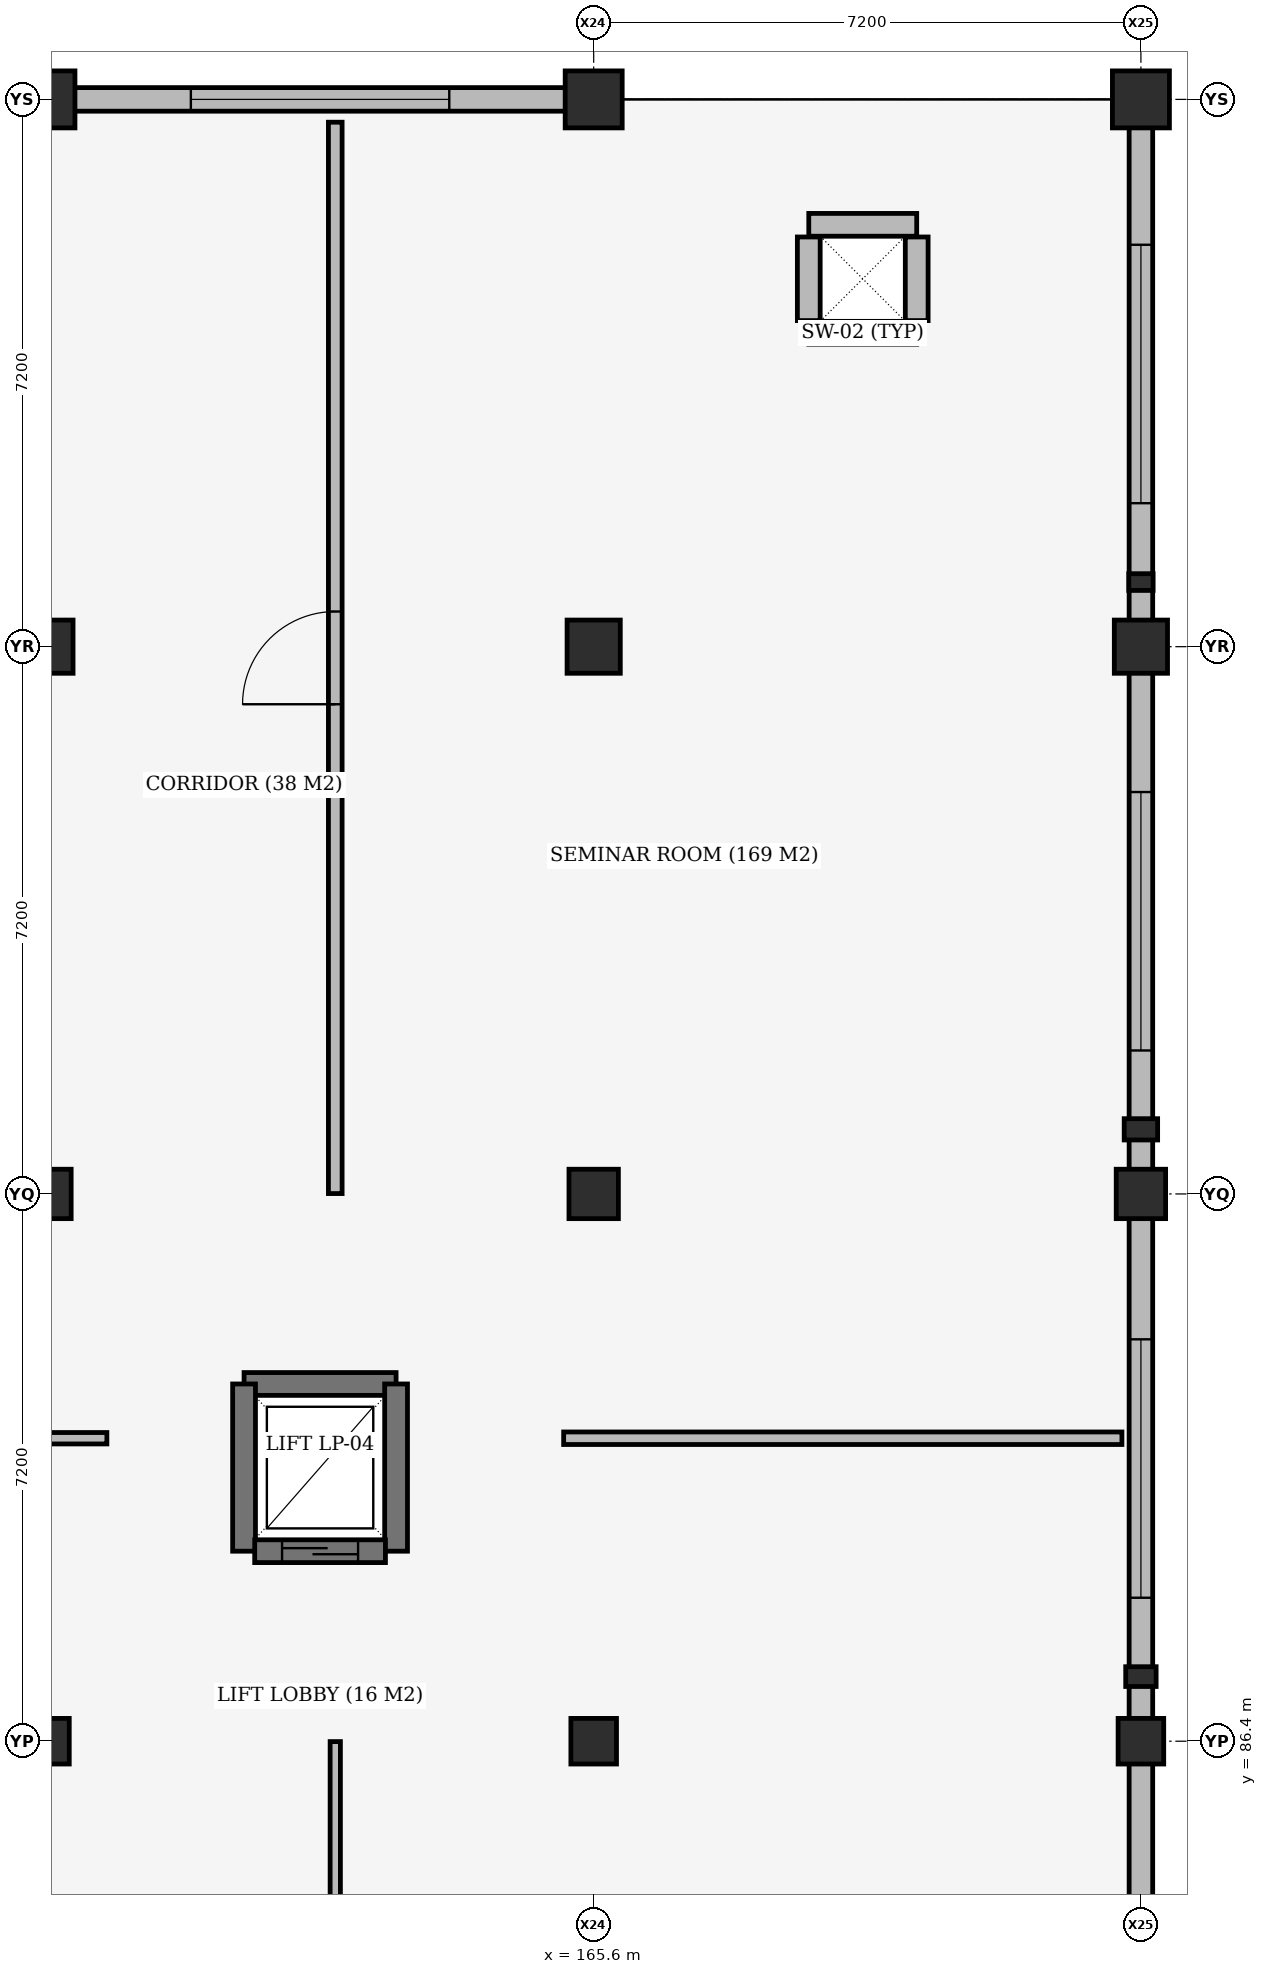
"""IFC4 building model, lengths in metres.
Left out: names, types, materials, properties, quantities, classifications, styles, units other than length and angle.
Written with IfcOpenShell. Run it as: python <this file> out.ifc"""

import sys

from ifc_helpers import new_model, si_unit, direction, frame, frame_2d, origin, origin_2d, place, context, subcontext, project, spatial, rectangle, extrude, element, fill, save


model = new_model("IFC4")
c1 = context("Model", 3, precision=1e-05, world=origin(), true_north=direction((0.0, 1.0)))
c2 = subcontext(c1, "Body", "Model", "MODEL_VIEW")
j1 = project(units=[si_unit("LENGTHUNIT", "METRE"), si_unit("PLANEANGLEUNIT", "RADIAN")], contexts=[c1])
p1 = place(None, origin())
s1 = spatial("IfcSite", under=j1, at=p1, CompositionType="ELEMENT")
p2 = place(p1, origin())
s2 = spatial("IfcBuilding", under=s1, at=p2, CompositionType="ELEMENT")
p3 = place(p2, frame((0.0, 0.0, 5.4)))
s3 = spatial("IfcBuildingStorey", under=s2, at=p3, CompositionType="ELEMENT", Elevation=5.4)
p4 = place(p3, frame((168.43, 104.93, 0.0), z_axis=(0.0, 0.0, 1.0), x_axis=(1.0, 0.0, 0.0)))
e1 = element("IfcWall", 1, at=p4, inside=s3, PredefinedType="SHEAR", context=c2, shape_type="SweptSolid", body=[
    extrude(rectangle(XDim=1.42, YDim=0.3, at=frame_2d((0.71, 0.0))), origin(), (0.0, 0.0, 1.0), 3.96),
])
p5 = place(p3, frame((169.85, 105.09, 0.0), z_axis=(0.0, 0.0, 1.0), x_axis=(0.0, 1.0, 0.0)))
e2 = element("IfcWall", 2, at=p5, inside=s3, PredefinedType="SHEAR", context=c2, shape_type="SweptSolid", body=[
    extrude(rectangle(XDim=1.1, YDim=0.3, at=frame_2d((0.55, 0.0))), origin(), (0.0, 0.0, 1.0), 3.96),
])
p6 = place(p3, frame((169.85, 106.35, 0.0), z_axis=(0.0, 0.0, 1.0), x_axis=(-1.0, 0.0, 0.0)))
e3 = element("IfcWall", 3, at=p6, inside=s3, PredefinedType="SHEAR", context=c2, shape_type="SweptSolid", body=[
    extrude(rectangle(XDim=1.42, YDim=0.3, at=frame_2d((0.71, 0.0))), origin(), (0.0, 0.0, 1.0), 3.96),
])
p7 = place(p3, frame((168.43, 106.19, 0.0), z_axis=(0.0, 0.0, 1.0), x_axis=(0.0, -1.0, 0.0)))
e4 = element("IfcWall", 4, at=p7, inside=s3, PredefinedType="SHEAR", context=c2, shape_type="SweptSolid", body=[
    extrude(rectangle(XDim=1.1, YDim=0.3, at=frame_2d((0.55, 0.0))), origin(), (0.0, 0.0, 1.0), 3.96),
])
p8 = place(p3, frame((158.4, 86.4, 0.0), z_axis=(0.0, 0.0, 1.0), x_axis=(1.0, 0.0, 0.0)))
e5 = element("IfcColumn", 5, at=p8, inside=s3, PredefinedType="COLUMN", context=c2, shape_type="SweptSolid", body=[
    extrude(rectangle(XDim=0.6, YDim=0.6, at=origin_2d()), origin(), (0.0, 0.0, 1.0), 3.92),
])
p9 = place(p3, frame((158.4, 93.6, 0.0), z_axis=(0.0, 0.0, 1.0), x_axis=(1.0, 0.0, 0.0)))
e6 = element("IfcColumn", 6, at=p9, inside=s3, PredefinedType="COLUMN", context=c2, shape_type="SweptSolid", body=[
    extrude(rectangle(XDim=0.65, YDim=0.65, at=origin_2d()), origin(), (0.0, 0.0, 1.0), 3.92),
])
p10 = place(p3, frame((158.4, 100.8, 0.0), z_axis=(0.0, 0.0, 1.0), x_axis=(1.0, 0.0, 0.0)))
e7 = element("IfcColumn", 7, at=p10, inside=s3, PredefinedType="COLUMN", context=c2, shape_type="SweptSolid", body=[
    extrude(rectangle(XDim=0.7, YDim=0.7, at=origin_2d()), origin(), (0.0, 0.0, 1.0), 3.92),
])
p11 = place(p3, frame((158.4, 108.0, 0.0), z_axis=(0.0, 0.0, 1.0), x_axis=(1.0, 0.0, 0.0)))
e8 = element("IfcColumn", 8, at=p11, inside=s3, PredefinedType="COLUMN", context=c2, shape_type="SweptSolid", body=[
    extrude(rectangle(XDim=0.75, YDim=0.75, at=origin_2d()), origin(), (0.0, 0.0, 1.0), 3.92),
])
p12 = place(p3, frame((165.6, 86.4, 0.0), z_axis=(0.0, 0.0, 1.0), x_axis=(1.0, 0.0, 0.0)))
e9 = element("IfcColumn", 9, at=p12, inside=s3, PredefinedType="COLUMN", context=c2, shape_type="SweptSolid", body=[
    extrude(rectangle(XDim=0.6, YDim=0.6, at=origin_2d()), origin(), (0.0, 0.0, 1.0), 3.92),
])
p13 = place(p3, frame((165.6, 93.6, 0.0), z_axis=(0.0, 0.0, 1.0), x_axis=(1.0, 0.0, 0.0)))
e10 = element("IfcColumn", 10, at=p13, inside=s3, PredefinedType="COLUMN", context=c2, shape_type="SweptSolid", body=[
    extrude(rectangle(XDim=0.65, YDim=0.65, at=origin_2d()), origin(), (0.0, 0.0, 1.0), 3.92),
])
p14 = place(p3, frame((165.6, 100.8, 0.0), z_axis=(0.0, 0.0, 1.0), x_axis=(1.0, 0.0, 0.0)))
e11 = element("IfcColumn", 11, at=p14, inside=s3, PredefinedType="COLUMN", context=c2, shape_type="SweptSolid", body=[
    extrude(rectangle(XDim=0.7, YDim=0.7, at=origin_2d()), origin(), (0.0, 0.0, 1.0), 3.92),
])
p15 = place(p3, frame((165.6, 108.0, 0.0), z_axis=(0.0, 0.0, 1.0), x_axis=(1.0, 0.0, 0.0)))
e12 = element("IfcColumn", 12, at=p15, inside=s3, PredefinedType="COLUMN", context=c2, shape_type="SweptSolid", body=[
    extrude(rectangle(XDim=0.75, YDim=0.75, at=origin_2d()), origin(), (0.0, 0.0, 1.0), 3.92),
])
p16 = place(p3, frame((172.8, 86.4, 0.0), z_axis=(0.0, 0.0, 1.0), x_axis=(1.0, 0.0, 0.0)))
e13 = element("IfcColumn", 13, at=p16, inside=s3, PredefinedType="COLUMN", context=c2, shape_type="SweptSolid", body=[
    extrude(rectangle(XDim=0.6, YDim=0.6, at=origin_2d()), origin(), (0.0, 0.0, 1.0), 3.92),
])
p17 = place(p3, frame((172.8, 93.6, 0.0), z_axis=(0.0, 0.0, 1.0), x_axis=(1.0, 0.0, 0.0)))
e14 = element("IfcColumn", 14, at=p17, inside=s3, PredefinedType="COLUMN", context=c2, shape_type="SweptSolid", body=[
    extrude(rectangle(XDim=0.65, YDim=0.65, at=origin_2d()), origin(), (0.0, 0.0, 1.0), 3.92),
])
p18 = place(p3, frame((172.8, 100.8, 0.0), z_axis=(0.0, 0.0, 1.0), x_axis=(1.0, 0.0, 0.0)))
e15 = element("IfcColumn", 15, at=p18, inside=s3, PredefinedType="COLUMN", context=c2, shape_type="SweptSolid", body=[
    extrude(rectangle(XDim=0.7, YDim=0.7, at=origin_2d()), origin(), (0.0, 0.0, 1.0), 3.92),
])
p19 = place(p3, frame((172.8, 108.0, 0.0), z_axis=(0.0, 0.0, 1.0), x_axis=(1.0, 0.0, 0.0)))
e16 = element("IfcColumn", 16, at=p19, inside=s3, PredefinedType="COLUMN", context=c2, shape_type="SweptSolid", body=[
    extrude(rectangle(XDim=0.75, YDim=0.75, at=origin_2d()), origin(), (0.0, 0.0, 1.0), 3.92),
])
p20 = place(p3, frame((172.8, 87.25, 0.0), z_axis=(0.0, 0.0, 1.0), x_axis=(1.0, 0.0, 0.0)))
e17 = element("IfcColumn", 17, at=p20, inside=s3, PredefinedType="PILASTER", context=c2, shape_type="SweptSolid", body=[
    extrude(rectangle(XDim=0.4, YDim=0.26, at=origin_2d()), origin(), (0.0, 0.0, 1.0), 3.92),
])
p21 = place(p3, frame((172.8, 94.45, 0.0), z_axis=(0.0, 0.0, 1.0), x_axis=(1.0, 0.0, 0.0)))
e18 = element("IfcColumn", 18, at=p21, inside=s3, PredefinedType="PILASTER", context=c2, shape_type="SweptSolid", body=[
    extrude(rectangle(XDim=0.44, YDim=0.28, at=origin_2d()), origin(), (0.0, 0.0, 1.0), 3.92),
])
p22 = place(p3, frame((172.8, 101.65, 0.0), z_axis=(0.0, 0.0, 1.0), x_axis=(1.0, 0.0, 0.0)))
e19 = element("IfcColumn", 19, at=p22, inside=s3, PredefinedType="PILASTER", context=c2, shape_type="SweptSolid", body=[
    extrude(rectangle(XDim=0.32, YDim=0.22, at=origin_2d()), origin(), (0.0, 0.0, 1.0), 3.92),
])
p23 = place(p3, frame((163.0, 91.1, 0.0), z_axis=(0.0, 0.0, 1.0), x_axis=(-1.0, 0.0, 0.0)))
e20 = element("IfcWall", 20, at=p23, inside=s3, PredefinedType="SHEAR", context=c2, shape_type="SweptSolid", body=[
    extrude(rectangle(XDim=2.0, YDim=0.3, at=frame_2d((1.0, 0.0))), origin(), (0.0, 0.0, 1.0), 3.92),
])
for number, where, z_axis, x_axis in (
    (21, (161.0, 91.1, 0.0), (0.0, 0.0, 1.0), (0.0, -1.0, 0.0)),
    (22, (163.0, 88.9, 0.0), (0.0, 0.0, 1.0), (0.0, 1.0, 0.0)),
):
    element("IfcWall", number, at=place(p3, frame(where, z_axis=z_axis, x_axis=x_axis)), inside=s3, PredefinedType="SHEAR", context=c2, shape_type="SweptSolid", body=[
        extrude(rectangle(XDim=2.2, YDim=0.3, at=frame_2d((1.1, 0.0))), origin(), (0.0, 0.0, 1.0), 3.92),
    ])
p24 = place(p3, frame((158.767, 108.0, 0.0), z_axis=(0.0, 0.0, 1.0), x_axis=(1.0, 0.0, 0.0)))
e23 = element("IfcWall", 23, at=p24, inside=s3, PredefinedType="STANDARD", context=c2, shape_type="SweptSolid", body=[
    extrude(rectangle(XDim=6.466, YDim=0.31, at=frame_2d((3.233, 0.0))), origin(), (0.0, 0.0, 1.0), 3.4),
])
p25 = place(p24, frame((1.533, 0.0, 0.9)))
e24 = element("IfcOpeningElement", 24, at=p25, cuts=e23, PredefinedType="OPENING", context=c2, shape_type="SweptSolid", body=[
    extrude(rectangle(XDim=3.4, YDim=1.5, at=frame_2d((1.7, 0.75))), frame((0.0, 0.165, 0.0), z_axis=(0.0, -1.0, 0.0), x_axis=(1.0, 0.0, 0.0)), (0.0, 0.0, 1.0), 0.33),
])
p26 = place(p3, frame((172.8, 86.108, 0.0), z_axis=(0.0, 0.0, 1.0), x_axis=(0.0, -1.0, 0.0)))
e25 = element("IfcWall", 25, at=p26, inside=s3, PredefinedType="STANDARD", context=c2, shape_type="SweptSolid", body=[
    extrude(rectangle(XDim=3.041, YDim=0.31, at=frame_2d((1.521, 0.0))), origin(), (0.0, 0.0, 1.0), 3.4),
])
p27 = place(p3, frame((172.8, 93.283, 0.0), z_axis=(0.0, 0.0, 1.0), x_axis=(0.0, -1.0, 0.0)))
e26 = element("IfcWall", 26, at=p27, inside=s3, PredefinedType="STANDARD", context=c2, shape_type="SweptSolid", body=[
    extrude(rectangle(XDim=6.591, YDim=0.31, at=frame_2d((3.295, 0.0))), origin(), (0.0, 0.0, 1.0), 3.34),
])
p28 = place(p27, frame((1.595, 0.0, 0.9)))
e27 = element("IfcOpeningElement", 27, at=p28, cuts=e26, PredefinedType="OPENING", context=c2, shape_type="SweptSolid", body=[
    extrude(rectangle(XDim=3.4, YDim=1.5, at=frame_2d((1.7, 0.75))), frame((0.0, 0.165, 0.0), z_axis=(0.0, -1.0, 0.0), x_axis=(1.0, 0.0, 0.0)), (0.0, 0.0, 1.0), 0.33),
])
p29 = place(p3, frame((172.8, 100.458, 0.0), z_axis=(0.0, 0.0, 1.0), x_axis=(0.0, -1.0, 0.0)))
e28 = element("IfcWall", 28, at=p29, inside=s3, PredefinedType="STANDARD", context=c2, shape_type="SweptSolid", body=[
    extrude(rectangle(XDim=6.541, YDim=0.31, at=frame_2d((3.271, 0.0))), origin(), (0.0, 0.0, 1.0), 3.28),
])
p30 = place(p29, frame((1.571, 0.0, 0.9)))
e29 = element("IfcOpeningElement", 29, at=p30, cuts=e28, PredefinedType="OPENING", context=c2, shape_type="SweptSolid", body=[
    extrude(rectangle(XDim=3.4, YDim=1.5, at=frame_2d((1.7, 0.75))), frame((0.0, 0.165, 0.0), z_axis=(0.0, -1.0, 0.0), x_axis=(1.0, 0.0, 0.0)), (0.0, 0.0, 1.0), 0.33),
])
p31 = place(p3, frame((172.8, 107.633, 0.0), z_axis=(0.0, 0.0, 1.0), x_axis=(0.0, -1.0, 0.0)))
e30 = element("IfcWall", 30, at=p31, inside=s3, PredefinedType="STANDARD", context=c2, shape_type="SweptSolid", body=[
    extrude(rectangle(XDim=6.491, YDim=0.31, at=frame_2d((3.246, 0.0))), origin(), (0.0, 0.0, 1.0), 3.24),
])
p32 = place(p31, frame((1.545, 0.0, 0.9)))
e31 = element("IfcOpeningElement", 31, at=p32, cuts=e30, PredefinedType="OPENING", context=c2, shape_type="SweptSolid", body=[
    extrude(rectangle(XDim=3.4, YDim=1.5, at=frame_2d((1.7, 0.75))), frame((0.0, 0.165, 0.0), z_axis=(0.0, -1.0, 0.0), x_axis=(1.0, 0.0, 0.0)), (0.0, 0.0, 1.0), 0.33),
])
p33 = place(p3, frame((162.86, 88.9, 0.0), z_axis=(0.0, 0.0, 1.0), x_axis=(-1.0, 0.0, 0.0)))
e32 = element("IfcWall", 32, at=p33, inside=s3, PredefinedType="SHEAR", context=c2, shape_type="SweptSolid", body=[
    extrude(rectangle(XDim=1.72, YDim=0.3, at=frame_2d((0.86, 0.0))), origin(), (0.0, 0.0, 1.0), 3.92),
])
p34 = place(p33, frame((0.36, 0.0, 0.0)))
e33 = element("IfcOpeningElement", 33, at=p34, cuts=e32, PredefinedType="OPENING", context=c2, shape_type="SweptSolid", body=[
    extrude(rectangle(XDim=1.0, YDim=2.1, at=frame_2d((0.5, 1.05))), frame((0.0, 0.16, 0.0), z_axis=(0.0, -1.0, 0.0), x_axis=(1.0, 0.0, 0.0)), (0.0, 0.0, 1.0), 0.32),
])
p35 = place(p3, frame((137.205, 90.386, 0.0), z_axis=(0.0, 0.0, 1.0), x_axis=(1.0, 0.0, 0.0)))
e34 = element("IfcWall", 34, at=p35, inside=s3, PredefinedType="PARTITIONING", context=c2, shape_type="SweptSolid", body=[
    extrude(rectangle(XDim=21.99, YDim=0.15, at=frame_2d((10.995, 0.0))), origin(), (0.0, 0.0, 1.0), 3.18),
])
p36 = place(p3, frame((162.2, 75.957, 0.0), z_axis=(0.0, 0.0, 1.0), x_axis=(0.0, 1.0, 0.0)))
e35 = element("IfcWall", 35, at=p36, inside=s3, PredefinedType="PARTITIONING", context=c2, shape_type="SweptSolid", body=[
    extrude(rectangle(XDim=10.438, YDim=0.135, at=frame_2d((5.219, 0.0))), origin(), (0.0, 0.0, 1.0), 3.18),
])
p37 = place(p36, frame((4.639, 0.0, 0.0)))
e36 = element("IfcOpeningElement", 36, at=p37, cuts=e35, PredefinedType="OPENING", context=c2, shape_type="SweptSolid", body=[
    extrude(rectangle(XDim=1.16, YDim=2.2, at=frame_2d((0.58, 1.1))), frame((0.0, 0.077, 0.0), z_axis=(0.0, -1.0, 0.0), x_axis=(1.0, 0.0, 0.0)), (0.0, 0.0, 1.0), 0.155),
])
p38 = place(p3, frame((165.205, 90.386, 0.0), z_axis=(0.0, 0.0, 1.0), x_axis=(1.0, 0.0, 0.0)))
e37 = element("IfcWall", 37, at=p38, inside=s3, PredefinedType="PARTITIONING", context=c2, shape_type="SweptSolid", body=[
    extrude(rectangle(XDim=7.345, YDim=0.165, at=frame_2d((3.672, 0.0))), origin(), (0.0, 0.0, 1.0), 3.28),
])
p39 = place(p3, frame((162.2, 93.605, 0.0), z_axis=(0.0, 0.0, 1.0), x_axis=(0.0, 1.0, 0.0)))
e38 = element("IfcWall", 38, at=p39, inside=s3, PredefinedType="PARTITIONING", context=c2, shape_type="SweptSolid", body=[
    extrude(rectangle(XDim=14.095, YDim=0.18, at=frame_2d((7.047, 0.0))), origin(), (0.0, 0.0, 1.0), 3.24),
])
p40 = place(p39, frame((6.438, 0.0, 0.0)))
e39 = element("IfcOpeningElement", 39, at=p40, cuts=e38, PredefinedType="OPENING", context=c2, shape_type="SweptSolid", body=[
    extrude(rectangle(XDim=1.22, YDim=2.25, at=frame_2d((0.61, 1.125))), frame((0.0, 0.1, 0.0), z_axis=(0.0, -1.0, 0.0), x_axis=(1.0, 0.0, 0.0)), (0.0, 0.0, 1.0), 0.2),
])
p41 = place(p25, origin())
e40 = element("IfcWindow", 40, at=p41, inside=s3, PartitioningType="DOUBLE_PANEL_VERTICAL", PredefinedType="WINDOW", context=c2, shape_type="SweptSolid", body=[
    extrude(rectangle(XDim=3.4, YDim=1.5, at=frame_2d((1.7, 0.75))), frame((0.0, 0.03, 0.0), z_axis=(0.0, -1.0, 0.0), x_axis=(1.0, 0.0, 0.0)), (0.0, 0.0, 1.0), 0.06),
])
fill(e24, e40)
p42 = place(p28, origin())
e41 = element("IfcWindow", 41, at=p42, inside=s3, PartitioningType="DOUBLE_PANEL_VERTICAL", PredefinedType="WINDOW", context=c2, shape_type="SweptSolid", body=[
    extrude(rectangle(XDim=3.4, YDim=1.5, at=frame_2d((1.7, 0.75))), frame((0.0, 0.03, 0.0), z_axis=(0.0, -1.0, 0.0), x_axis=(1.0, 0.0, 0.0)), (0.0, 0.0, 1.0), 0.06),
])
fill(e27, e41)
p43 = place(p30, origin())
e42 = element("IfcWindow", 42, at=p43, inside=s3, PartitioningType="DOUBLE_PANEL_VERTICAL", PredefinedType="WINDOW", context=c2, shape_type="SweptSolid", body=[
    extrude(rectangle(XDim=3.4, YDim=1.5, at=frame_2d((1.7, 0.75))), frame((0.0, 0.03, 0.0), z_axis=(0.0, -1.0, 0.0), x_axis=(1.0, 0.0, 0.0)), (0.0, 0.0, 1.0), 0.06),
])
fill(e29, e42)
p44 = place(p32, origin())
e43 = element("IfcWindow", 43, at=p44, inside=s3, PartitioningType="DOUBLE_PANEL_VERTICAL", PredefinedType="WINDOW", context=c2, shape_type="SweptSolid", body=[
    extrude(rectangle(XDim=3.4, YDim=1.5, at=frame_2d((1.7, 0.75))), frame((0.0, 0.03, 0.0), z_axis=(0.0, -1.0, 0.0), x_axis=(1.0, 0.0, 0.0)), (0.0, 0.0, 1.0), 0.06),
])
fill(e31, e43)
p45 = place(p34, origin())
e44 = element("IfcDoor", 44, at=p45, inside=s3, OperationType="SLIDING_TO_LEFT", PredefinedType="DOOR", context=c2, shape_type="SweptSolid", body=[
    extrude(rectangle(XDim=1.0, YDim=2.1, at=frame_2d((0.5, 1.05))), frame((0.0, 0.025, 0.0), z_axis=(0.0, -1.0, 0.0), x_axis=(1.0, 0.0, 0.0)), (0.0, 0.0, 1.0), 0.05),
])
fill(e33, e44)
p46 = place(p40, origin())
e45 = element("IfcDoor", 45, at=p46, inside=s3, OperationType="SINGLE_SWING_LEFT", PredefinedType="DOOR", context=c2, shape_type="SweptSolid", body=[
    extrude(rectangle(XDim=1.22, YDim=2.25, at=frame_2d((0.61, 1.125))), frame((0.0, 0.025, 0.0), z_axis=(0.0, -1.0, 0.0), x_axis=(1.0, 0.0, 0.0)), (0.0, 0.0, 1.0), 0.05),
])
fill(e39, e45)
save(model, sys.argv[1])
